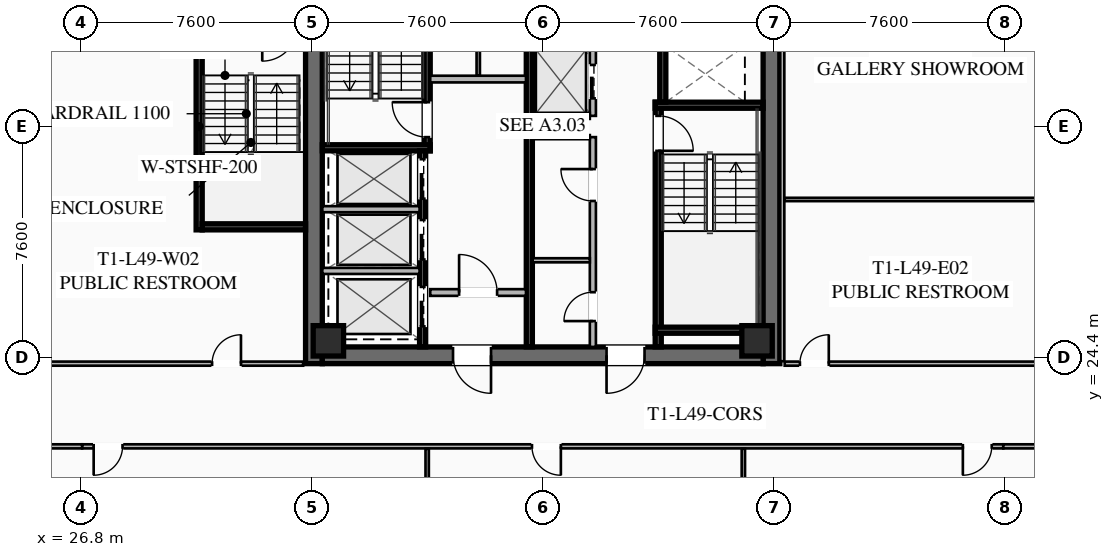
"""IFC4 building model, lengths in metres.
Left out: names, types, materials, properties, quantities, classifications, styles, units other than length and angle.
Written with IfcOpenShell. Run it as: python <this file> out.ifc"""

import sys

from ifc_helpers import new_model, si_unit, direction, frame, frame_2d, origin, origin_2d, place, context, subcontext, project, spatial, rectangle, hollow_rectangle, extrude, element, fill, save


model = new_model("IFC4")
c1 = context("Model", 3, precision=1e-05, world=origin(), true_north=direction((0.0, 1.0)))
c2 = subcontext(c1, "Body", "Model", "MODEL_VIEW")
j1 = project(units=[si_unit("LENGTHUNIT", "METRE"), si_unit("PLANEANGLEUNIT", "RADIAN")], contexts=[c1])
p1 = place(None, origin())
s1 = spatial("IfcSite", under=j1, at=p1, CompositionType="ELEMENT")
p2 = place(p1, origin())
s2 = spatial("IfcBuilding", under=s1, at=p2, CompositionType="ELEMENT")
p3 = place(p2, frame((0.0, 0.0, 181.85)))
s3 = spatial("IfcBuildingStorey", under=s2, at=p3, CompositionType="ELEMENT", Elevation=181.85)
for number, where, z_axis, x_axis in (
    (1, (34.475, 24.2, 0.0), (0.0, 0.0, 1.0), (0.0, 1.0, 0.0)),
    (2, (49.525, 39.8, 0.0), (0.0, 0.0, 1.0), (0.0, -1.0, 0.0)),
):
    element("IfcWall", number, at=place(p3, frame(where, z_axis=z_axis, x_axis=x_axis)), inside=s3, PredefinedType="SHEAR", context=c2, shape_type="SweptSolid", body=[
        extrude(rectangle(XDim=15.6, YDim=0.55, at=frame_2d((7.8, 0.0))), origin(), (0.0, 0.0, 1.0), 3.55),
    ])
p4 = place(p3, frame((49.25, 24.475, 0.0), z_axis=(0.0, 0.0, 1.0), x_axis=(-1.0, 0.0, 0.0)))
e3 = element("IfcWall", 3, at=p4, inside=s3, PredefinedType="SHEAR", context=c2, shape_type="SweptSolid", body=[
    extrude(rectangle(XDim=14.5, YDim=0.55, at=frame_2d((7.25, 0.0))), origin(), (0.0, 0.0, 1.0), 3.55),
])
p5 = place(p4, frame((8.95, 0.0, 0.0)))
e4 = element("IfcOpeningElement", 4, at=p5, cuts=e3, PredefinedType="OPENING", context=c2, shape_type="SweptSolid", body=[
    extrude(rectangle(XDim=1.25, YDim=2.25, at=frame_2d((0.625, 1.125))), frame((0.0, 0.285, 0.0), z_axis=(0.0, -1.0, 0.0), x_axis=(1.0, 0.0, 0.0)), (0.0, 0.0, 1.0), 0.57),
])
p6 = place(p4, frame((3.9, 0.0, 0.0)))
e5 = element("IfcOpeningElement", 5, at=p6, cuts=e3, PredefinedType="OPENING", context=c2, shape_type="SweptSolid", body=[
    extrude(rectangle(XDim=1.25, YDim=2.25, at=frame_2d((0.625, 1.125))), frame((0.0, 0.285, 0.0), z_axis=(0.0, -1.0, 0.0), x_axis=(1.0, 0.0, 0.0)), (0.0, 0.0, 1.0), 0.57),
])
for number, where, z_axis, x_axis in (
    (6, (34.95, 24.95, 0.0), (0.0, 0.0, 1.0), (1.0, 0.0, 0.0)),
    (7, (49.05, 24.95, 0.0), (0.0, 0.0, 1.0), (1.0, 0.0, 0.0)),
):
    element("IfcColumn", number, at=place(p3, frame(where, z_axis=z_axis, x_axis=x_axis)), inside=s3, PredefinedType="COLUMN", context=c2, shape_type="SweptSolid", body=[
        extrude(hollow_rectangle(XDim=1.0, YDim=1.0, WallThickness=0.04, at=origin_2d()), origin(), (0.0, 0.0, 1.0), 3.37),
    ])
p7 = place(p3, frame((38.2, 31.2, 0.0), z_axis=(0.0, 0.0, 1.0), x_axis=(0.0, 1.0, 0.0)))
e8 = element("IfcWall", 8, at=p7, inside=s3, PredefinedType="SHEAR", context=c2, shape_type="SweptSolid", body=[
    extrude(rectangle(XDim=8.05, YDim=0.2, at=frame_2d((4.025, 0.0))), origin(), (0.0, 0.0, 1.0), 3.37),
])
p8 = place(p7, frame((0.45, 0.0, 0.0)))
e9 = element("IfcOpeningElement", 9, at=p8, cuts=e8, PredefinedType="OPENING", context=c2, shape_type="SweptSolid", body=[
    extrude(rectangle(XDim=1.15, YDim=2.2, at=frame_2d((0.575, 1.1))), frame((0.0, 0.11, 0.0), z_axis=(0.0, -1.0, 0.0), x_axis=(1.0, 0.0, 0.0)), (0.0, 0.0, 1.0), 0.22),
])
p9 = place(p3, frame((34.75, 31.3, 0.0), z_axis=(0.0, 0.0, 1.0), x_axis=(1.0, 0.0, 0.0)))
e10 = element("IfcWall", 10, at=p9, inside=s3, PredefinedType="SHEAR", context=c2, shape_type="SweptSolid", body=[
    extrude(rectangle(XDim=3.55, YDim=0.2, at=frame_2d((1.775, 0.0))), origin(), (0.0, 0.0, 1.0), 3.37),
])
p10 = place(p3, frame((45.8, 32.8, 0.0), z_axis=(0.0, 0.0, 1.0), x_axis=(0.0, -1.0, 0.0)))
e11 = element("IfcWall", 11, at=p10, inside=s3, PredefinedType="SHEAR", context=c2, shape_type="SweptSolid", body=[
    extrude(rectangle(XDim=8.05, YDim=0.2, at=frame_2d((4.025, 0.0))), origin(), (0.0, 0.0, 1.0), 3.37),
])
p11 = place(p10, frame((0.45, 0.0, 0.0)))
e12 = element("IfcOpeningElement", 12, at=p11, cuts=e11, PredefinedType="OPENING", context=c2, shape_type="SweptSolid", body=[
    extrude(rectangle(XDim=1.15, YDim=2.2, at=frame_2d((0.575, 1.1))), frame((0.0, 0.11, 0.0), z_axis=(0.0, -1.0, 0.0), x_axis=(1.0, 0.0, 0.0)), (0.0, 0.0, 1.0), 0.22),
])
for number, where, z_axis, x_axis in (
    (13, (45.7, 32.7, 0.0), (0.0, 0.0, 1.0), (1.0, 0.0, 0.0)),
    (14, (45.7, 25.3, 0.0), (0.0, 0.0, 1.0), (1.0, 0.0, 0.0)),
):
    element("IfcWall", number, at=place(p3, frame(where, z_axis=z_axis, x_axis=x_axis)), inside=s3, PredefinedType="SHEAR", context=c2, shape_type="SweptSolid", body=[
        extrude(rectangle(XDim=3.55, YDim=0.2, at=frame_2d((1.775, 0.0))), origin(), (0.0, 0.0, 1.0), 3.37),
    ])
p12 = place(p3, frame((41.56, 24.75, 0.0), z_axis=(0.0, 0.0, 1.0), x_axis=(0.0, 1.0, 0.0)))
e15 = element("IfcWall", 15, at=p12, inside=s3, PredefinedType="SHEAR", context=c2, shape_type="SweptSolid", body=[
    extrude(rectangle(XDim=14.5, YDim=0.2, at=frame_2d((7.25, 0.0))), origin(), (0.0, 0.0, 1.0), 3.37),
])
p13 = place(p3, frame((38.3, 33.56, 0.0), z_axis=(0.0, 0.0, 1.0), x_axis=(1.0, 0.0, 0.0)))
e16 = element("IfcWall", 16, at=p13, inside=s3, PredefinedType="SOLIDWALL", context=c2, shape_type="SweptSolid", body=[
    extrude(rectangle(XDim=3.15, YDim=0.22, at=frame_2d((1.575, 0.0))), origin(), (0.0, 0.0, 1.0), 2.723),
])
p14 = place(p3, frame((38.3, 26.54, 0.0), z_axis=(0.0, 0.0, 1.0), x_axis=(1.0, 0.0, 0.0)))
e17 = element("IfcWall", 17, at=p14, inside=s3, PredefinedType="SOLIDWALL", context=c2, shape_type="SweptSolid", body=[
    extrude(rectangle(XDim=3.15, YDim=0.22, at=frame_2d((1.575, 0.0))), origin(), (0.0, 0.0, 1.0), 2.723),
])
p15 = place(p14, frame((0.95, 0.0, 0.0)))
e18 = element("IfcOpeningElement", 18, at=p15, cuts=e17, PredefinedType="OPENING", context=c2, shape_type="SweptSolid", body=[
    extrude(rectangle(XDim=1.25, YDim=2.25, at=frame_2d((0.625, 1.125))), frame((0.0, 0.12, 0.0), z_axis=(0.0, -1.0, 0.0), x_axis=(1.0, 0.0, 0.0)), (0.0, 0.0, 1.0), 0.24),
])
p16 = place(p3, frame((38.05, 24.75, 0.0), z_axis=(0.0, 0.0, 1.0), x_axis=(0.0, 1.0, 0.0)))
e19 = element("IfcWall", 19, at=p16, inside=s3, PredefinedType="SHEAR", context=c2, shape_type="SweptSolid", body=[
    extrude(rectangle(XDim=6.45, YDim=0.2, at=frame_2d((3.225, 0.0))), origin(), (0.0, 0.0, 1.0), 3.37),
])
p17 = place(p16, frame((4.875, 0.0, 0.0)))
e20 = element("IfcOpeningElement", 20, at=p17, cuts=e19, PredefinedType="OPENING", context=c2, shape_type="SweptSolid", body=[
    extrude(rectangle(XDim=1.3, YDim=2.25, at=frame_2d((0.65, 1.125))), frame((0.0, 0.11, 0.0), z_axis=(0.0, -1.0, 0.0), x_axis=(1.0, 0.0, 0.0)), (0.0, 0.0, 1.0), 0.22),
])
p18 = place(p16, frame((2.875, 0.0, 0.0)))
e21 = element("IfcOpeningElement", 21, at=p18, cuts=e19, PredefinedType="OPENING", context=c2, shape_type="SweptSolid", body=[
    extrude(rectangle(XDim=1.3, YDim=2.25, at=frame_2d((0.65, 1.125))), frame((0.0, 0.11, 0.0), z_axis=(0.0, -1.0, 0.0), x_axis=(1.0, 0.0, 0.0)), (0.0, 0.0, 1.0), 0.22),
])
p19 = place(p16, frame((0.675, 0.0, 0.0)))
e22 = element("IfcOpeningElement", 22, at=p19, cuts=e19, PredefinedType="OPENING", context=c2, shape_type="SweptSolid", body=[
    extrude(rectangle(XDim=1.3, YDim=2.25, at=frame_2d((0.65, 1.125))), frame((0.0, 0.11, 0.0), z_axis=(0.0, -1.0, 0.0), x_axis=(1.0, 0.0, 0.0)), (0.0, 0.0, 1.0), 0.22),
])
for number, where, z_axis, x_axis in (
    (23, (34.75, 27.25, 0.0), (0.0, 0.0, 1.0), (1.0, 0.0, 0.0)),
    (24, (34.75, 29.28, 0.0), (0.0, 0.0, 1.0), (1.0, 0.0, 0.0)),
):
    element("IfcWall", number, at=place(p3, frame(where, z_axis=z_axis, x_axis=x_axis)), inside=s3, PredefinedType="SOLIDWALL", context=c2, shape_type="SweptSolid", body=[
        extrude(rectangle(XDim=3.2, YDim=0.2, at=frame_2d((1.6, 0.0))), origin(), (0.0, 0.0, 1.0), 3.37),
    ])
p20 = place(p3, frame((45.95, 39.25, 0.0), z_axis=(0.0, 0.0, 1.0), x_axis=(0.0, -1.0, 0.0)))
e25 = element("IfcWall", 25, at=p20, inside=s3, PredefinedType="SHEAR", context=c2, shape_type="SweptSolid", body=[
    extrude(rectangle(XDim=6.45, YDim=0.2, at=frame_2d((3.225, 0.0))), origin(), (0.0, 0.0, 1.0), 3.37),
])
p21 = place(p3, frame((39.88, 33.68, 0.0), z_axis=(0.0, 0.0, 1.0), x_axis=(0.0, 1.0, 0.0)))
e26 = element("IfcWall", 26, at=p21, inside=s3, PredefinedType="PARTITIONING", context=c2, shape_type="SweptSolid", body=[
    extrude(rectangle(XDim=3.8, YDim=0.11, at=frame_2d((1.9, 0.0))), origin(), (0.0, 0.0, 1.0), 2.723),
])
p22 = place(p3, frame((43.65, 24.75, 0.0), z_axis=(0.0, 0.0, 1.0), x_axis=(0.0, 1.0, 0.0)))
e27 = element("IfcWall", 27, at=p22, inside=s3, PredefinedType="SOLIDWALL", context=c2, shape_type="SweptSolid", body=[
    extrude(rectangle(XDim=6.9, YDim=0.2, at=frame_2d((3.45, 0.0))), origin(), (0.0, 0.0, 1.0), 2.723),
])
p23 = place(p22, frame((0.85, 0.0, 0.0)))
e28 = element("IfcOpeningElement", 28, at=p23, cuts=e27, PredefinedType="OPENING", context=c2, shape_type="SweptSolid", body=[
    extrude(rectangle(XDim=0.95, YDim=2.05, at=frame_2d((0.475, 1.025))), frame((0.0, 0.11, 0.0), z_axis=(0.0, -1.0, 0.0), x_axis=(1.0, 0.0, 0.0)), (0.0, 0.0, 1.0), 0.22),
])
p24 = place(p22, frame((4.8, 0.0, 0.0)))
e29 = element("IfcOpeningElement", 29, at=p24, cuts=e27, PredefinedType="OPENING", context=c2, shape_type="SweptSolid", body=[
    extrude(rectangle(XDim=1.05, YDim=2.2, at=frame_2d((0.525, 1.1))), frame((0.0, 0.11, 0.0), z_axis=(0.0, -1.0, 0.0), x_axis=(1.0, 0.0, 0.0)), (0.0, 0.0, 1.0), 0.22),
])
for number, where, z_axis, x_axis in (
    (30, (41.67, 31.65, 0.0), (0.0, 0.0, 1.0), (1.0, 0.0, 0.0)),
    (31, (41.67, 27.6, 0.0), (0.0, 0.0, 1.0), (1.0, 0.0, 0.0)),
):
    element("IfcWall", number, at=place(p3, frame(where, z_axis=z_axis, x_axis=x_axis)), inside=s3, PredefinedType="PARTITIONING", context=c2, shape_type="SweptSolid", body=[
        extrude(rectangle(XDim=1.88, YDim=0.135, at=frame_2d((0.94, 0.0))), origin(), (0.0, 0.0, 1.0), 2.723),
    ])
p25 = place(p3, frame((43.65, 32.35, 0.0), z_axis=(0.0, 0.0, 1.0), x_axis=(0.0, 1.0, 0.0)))
e32 = element("IfcWall", 32, at=p25, inside=s3, PredefinedType="SOLIDWALL", context=c2, shape_type="SweptSolid", body=[
    extrude(rectangle(XDim=6.9, YDim=0.2, at=frame_2d((3.45, 0.0))), origin(), (0.0, 0.0, 1.0), 3.37),
])
p26 = place(p25, frame((0.575, 0.0, 0.0)))
e33 = element("IfcOpeningElement", 33, at=p26, cuts=e32, PredefinedType="OPENING", context=c2, shape_type="SweptSolid", body=[
    extrude(rectangle(XDim=1.1, YDim=2.2, at=frame_2d((0.55, 1.1))), frame((0.0, 0.11, 0.0), z_axis=(0.0, -1.0, 0.0), x_axis=(1.0, 0.0, 0.0)), (0.0, 0.0, 1.0), 0.22),
])
p27 = place(p25, frame((2.825, 0.0, 0.0)))
e34 = element("IfcOpeningElement", 34, at=p27, cuts=e32, PredefinedType="OPENING", context=c2, shape_type="SweptSolid", body=[
    extrude(rectangle(XDim=1.1, YDim=2.2, at=frame_2d((0.55, 1.1))), frame((0.0, 0.11, 0.0), z_axis=(0.0, -1.0, 0.0), x_axis=(1.0, 0.0, 0.0)), (0.0, 0.0, 1.0), 0.22),
])
p28 = place(p25, frame((5.075, 0.0, 0.0)))
e35 = element("IfcOpeningElement", 35, at=p28, cuts=e32, PredefinedType="OPENING", context=c2, shape_type="SweptSolid", body=[
    extrude(rectangle(XDim=1.1, YDim=2.2, at=frame_2d((0.55, 1.1))), frame((0.0, 0.11, 0.0), z_axis=(0.0, -1.0, 0.0), x_axis=(1.0, 0.0, 0.0)), (0.0, 0.0, 1.0), 0.22),
])
p29 = place(p3, frame((41.67, 32.35, 0.0), z_axis=(0.0, 0.0, 1.0), x_axis=(1.0, 0.0, 0.0)))
e36 = element("IfcWall", 36, at=p29, inside=s3, PredefinedType="SOLIDWALL", context=c2, shape_type="SweptSolid", body=[
    extrude(rectangle(XDim=1.88, YDim=0.2, at=frame_2d((0.94, 0.0))), origin(), (0.0, 0.0, 1.0), 3.37),
])
p30 = place(p3, frame((30.7, 28.6, 0.0), z_axis=(0.0, 0.0, 1.0), x_axis=(0.0, 1.0, 0.0)))
e37 = element("IfcWall", 37, at=p30, inside=s3, PredefinedType="SHEAR", context=c2, shape_type="SweptSolid", body=[
    extrude(rectangle(XDim=6.8, YDim=0.2, at=frame_2d((3.4, 0.0))), origin(), (0.0, 0.0, 1.0), 3.37),
])
p31 = place(p3, frame((30.8, 28.7, 0.0), z_axis=(0.0, 0.0, 1.0), x_axis=(1.0, 0.0, 0.0)))
e38 = element("IfcWall", 38, at=p31, inside=s3, PredefinedType="SHEAR", context=c2, shape_type="SweptSolid", body=[
    extrude(rectangle(XDim=3.4, YDim=0.2, at=frame_2d((1.7, 0.0))), origin(), (0.0, 0.0, 1.0), 3.37),
])
p32 = place(p3, frame((57.15, 21.48, 0.0), z_axis=(0.0, 0.0, 1.0), x_axis=(-1.0, 0.0, 0.0)))
e39 = element("IfcWall", 39, at=p32, inside=s3, PredefinedType="PARTITIONING", context=c2, shape_type="SweptSolid", body=[
    extrude(rectangle(XDim=30.3, YDim=0.135, at=frame_2d((15.15, 0.0))), origin(), (0.0, 0.0, 1.0), 2.723),
])
p33 = place(p32, frame((28.97, 0.0, 0.0)))
e40 = element("IfcOpeningElement", 40, at=p33, cuts=e39, PredefinedType="OPENING", context=c2, shape_type="SweptSolid", body=[
    extrude(rectangle(XDim=0.95, YDim=2.05, at=frame_2d((0.475, 1.025))), frame((0.0, 0.077, 0.0), z_axis=(0.0, -1.0, 0.0), x_axis=(1.0, 0.0, 0.0)), (0.0, 0.0, 1.0), 0.155),
])
p34 = place(p32, frame((14.553, 0.0, 0.0)))
e41 = element("IfcOpeningElement", 41, at=p34, cuts=e39, PredefinedType="OPENING", context=c2, shape_type="SweptSolid", body=[
    extrude(rectangle(XDim=0.95, YDim=2.05, at=frame_2d((0.475, 1.025))), frame((0.0, 0.077, 0.0), z_axis=(0.0, -1.0, 0.0), x_axis=(1.0, 0.0, 0.0)), (0.0, 0.0, 1.0), 0.155),
])
p35 = place(p32, frame((0.38, 0.0, 0.0)))
e42 = element("IfcOpeningElement", 42, at=p35, cuts=e39, PredefinedType="OPENING", context=c2, shape_type="SweptSolid", body=[
    extrude(rectangle(XDim=0.95, YDim=2.05, at=frame_2d((0.475, 1.025))), frame((0.0, 0.077, 0.0), z_axis=(0.0, -1.0, 0.0), x_axis=(1.0, 0.0, 0.0)), (0.0, 0.0, 1.0), 0.155),
])
for number, where, z_axis, x_axis in (
    (43, (24.32, 21.48, 0.0), (0.0, 0.0, 1.0), (1.0, 0.0, 0.0)),
    (44, (57.15, 21.48, 0.0), (0.0, 0.0, 1.0), (1.0, 0.0, 0.0)),
):
    element("IfcWall", number, at=place(p3, frame(where, z_axis=z_axis, x_axis=x_axis)), inside=s3, PredefinedType="PARTITIONING", context=c2, shape_type="SweptSolid", body=[
        extrude(rectangle(XDim=2.53, YDim=0.135, at=frame_2d((1.265, 0.0))), origin(), (0.0, 0.0, 1.0), 2.723),
    ])
for number, where, z_axis, x_axis in (
    (45, (38.2, 14.47, 0.0), (0.0, 0.0, 1.0), (0.0, 1.0, 0.0)),
    (46, (48.6, 14.47, 0.0), (0.0, 0.0, 1.0), (0.0, 1.0, 0.0)),
):
    element("IfcWall", number, at=place(p3, frame(where, z_axis=z_axis, x_axis=x_axis)), inside=s3, PredefinedType="PARTITIONING", context=c2, shape_type="SweptSolid", body=[
        extrude(rectangle(XDim=6.93, YDim=0.11, at=frame_2d((3.465, 0.0))), origin(), (0.0, 0.0, 1.0), 2.723),
    ])
p36 = place(p3, frame((49.88, 39.72, 0.0), z_axis=(0.0, 0.0, 1.0), x_axis=(0.0, -1.0, 0.0)))
e47 = element("IfcWall", 47, at=p36, inside=s3, PredefinedType="PARTITIONING", context=c2, shape_type="SweptSolid", body=[
    extrude(rectangle(XDim=15.44, YDim=0.135, at=frame_2d((7.72, 0.0))), origin(), (0.0, 0.0, 1.0), 2.723),
])
p37 = place(p3, frame((49.96, 24.2, 0.0), z_axis=(0.0, 0.0, 1.0), x_axis=(1.0, 0.0, 0.0)))
e48 = element("IfcWall", 48, at=p37, inside=s3, PredefinedType="PARTITIONING", context=c2, shape_type="SweptSolid", body=[
    extrude(rectangle(XDim=9.72, YDim=0.135, at=frame_2d((4.86, 0.0))), origin(), (0.0, 0.0, 1.0), 2.723),
])
p38 = place(p37, frame((0.5, 0.0, 0.0)))
e49 = element("IfcOpeningElement", 49, at=p38, cuts=e48, PredefinedType="OPENING", context=c2, shape_type="SweptSolid", body=[
    extrude(rectangle(XDim=0.95, YDim=2.05, at=frame_2d((0.475, 1.025))), frame((0.0, 0.077, 0.0), z_axis=(0.0, -1.0, 0.0), x_axis=(1.0, 0.0, 0.0)), (0.0, 0.0, 1.0), 0.155),
])
p39 = place(p3, frame((49.96, 29.6, 0.0), z_axis=(0.0, 0.0, 1.0), x_axis=(1.0, 0.0, 0.0)))
e50 = element("IfcWall", 50, at=p39, inside=s3, PredefinedType="PARTITIONING", context=c2, shape_type="SweptSolid", body=[
    extrude(rectangle(XDim=9.72, YDim=0.11, at=frame_2d((4.86, 0.0))), origin(), (0.0, 0.0, 1.0), 2.723),
])
p40 = place(p3, frame((24.32, 24.2, 0.0), z_axis=(0.0, 0.0, 1.0), x_axis=(1.0, 0.0, 0.0)))
e51 = element("IfcWall", 51, at=p40, inside=s3, PredefinedType="PARTITIONING", context=c2, shape_type="SweptSolid", body=[
    extrude(rectangle(XDim=9.8, YDim=0.135, at=frame_2d((4.9, 0.0))), origin(), (0.0, 0.0, 1.0), 2.723),
])
p41 = place(p40, frame((6.805, 0.0, 0.0)))
e52 = element("IfcOpeningElement", 52, at=p41, cuts=e51, PredefinedType="OPENING", context=c2, shape_type="SweptSolid", body=[
    extrude(rectangle(XDim=0.95, YDim=2.05, at=frame_2d((0.475, 1.025))), frame((0.0, 0.077, 0.0), z_axis=(0.0, -1.0, 0.0), x_axis=(1.0, 0.0, 0.0)), (0.0, 0.0, 1.0), 0.155),
])
p42 = place(p5, origin())
e53 = element("IfcDoor", 53, at=p42, inside=s3, OperationType="SINGLE_SWING_LEFT", PredefinedType="DOOR", context=c2, shape_type="SweptSolid", body=[
    extrude(rectangle(XDim=1.25, YDim=2.25, at=frame_2d((0.625, 1.125))), frame((0.0, 0.025, 0.0), z_axis=(0.0, -1.0, 0.0), x_axis=(1.0, 0.0, 0.0)), (0.0, 0.0, 1.0), 0.05),
])
fill(e4, e53)
p43 = place(p6, origin())
e54 = element("IfcDoor", 54, at=p43, inside=s3, OperationType="SINGLE_SWING_RIGHT", PredefinedType="DOOR", context=c2, shape_type="SweptSolid", body=[
    extrude(rectangle(XDim=1.25, YDim=2.25, at=frame_2d((0.625, 1.125))), frame((0.0, 0.025, 0.0), z_axis=(0.0, -1.0, 0.0), x_axis=(1.0, 0.0, 0.0)), (0.0, 0.0, 1.0), 0.05),
])
fill(e5, e54)
p44 = place(p8, origin())
e55 = element("IfcDoor", 55, at=p44, inside=s3, OperationType="SINGLE_SWING_RIGHT", PredefinedType="DOOR", context=c2, shape_type="SweptSolid", body=[
    extrude(rectangle(XDim=1.15, YDim=2.2, at=frame_2d((0.575, 1.1))), frame((0.0, 0.025, 0.0), z_axis=(0.0, -1.0, 0.0), x_axis=(1.0, 0.0, 0.0)), (0.0, 0.0, 1.0), 0.05),
])
fill(e9, e55)
p45 = place(p11, origin())
e56 = element("IfcDoor", 56, at=p45, inside=s3, OperationType="SINGLE_SWING_RIGHT", PredefinedType="DOOR", context=c2, shape_type="SweptSolid", body=[
    extrude(rectangle(XDim=1.15, YDim=2.2, at=frame_2d((0.575, 1.1))), frame((0.0, 0.025, 0.0), z_axis=(0.0, -1.0, 0.0), x_axis=(1.0, 0.0, 0.0)), (0.0, 0.0, 1.0), 0.05),
])
fill(e12, e56)
p46 = place(p15, origin())
e57 = element("IfcDoor", 57, at=p46, inside=s3, OperationType="SINGLE_SWING_LEFT", PredefinedType="DOOR", context=c2, shape_type="SweptSolid", body=[
    extrude(rectangle(XDim=1.25, YDim=2.25, at=frame_2d((0.625, 1.125))), frame((0.0, 0.025, 0.0), z_axis=(0.0, -1.0, 0.0), x_axis=(1.0, 0.0, 0.0)), (0.0, 0.0, 1.0), 0.05),
])
fill(e18, e57)
p47 = place(p23, origin())
e58 = element("IfcDoor", 58, at=p47, inside=s3, OperationType="SINGLE_SWING_LEFT", PredefinedType="DOOR", context=c2, shape_type="SweptSolid", body=[
    extrude(rectangle(XDim=0.95, YDim=2.05, at=frame_2d((0.475, 1.025))), frame((0.0, 0.025, 0.0), z_axis=(0.0, -1.0, 0.0), x_axis=(1.0, 0.0, 0.0)), (0.0, 0.0, 1.0), 0.05),
])
fill(e28, e58)
p48 = place(p24, origin())
e59 = element("IfcDoor", 59, at=p48, inside=s3, OperationType="SINGLE_SWING_RIGHT", PredefinedType="DOOR", context=c2, shape_type="SweptSolid", body=[
    extrude(rectangle(XDim=1.05, YDim=2.2, at=frame_2d((0.525, 1.1))), frame((0.0, 0.025, 0.0), z_axis=(0.0, -1.0, 0.0), x_axis=(1.0, 0.0, 0.0)), (0.0, 0.0, 1.0), 0.05),
])
fill(e29, e59)
p49 = place(p33, origin())
e60 = element("IfcDoor", 60, at=p49, inside=s3, OperationType="SINGLE_SWING_RIGHT", PredefinedType="DOOR", context=c2, shape_type="SweptSolid", body=[
    extrude(rectangle(XDim=0.95, YDim=2.05, at=frame_2d((0.475, 1.025))), frame((0.0, 0.025, 0.0), z_axis=(0.0, -1.0, 0.0), x_axis=(1.0, 0.0, 0.0)), (0.0, 0.0, 1.0), 0.05),
])
fill(e40, e60)
p50 = place(p34, origin())
e61 = element("IfcDoor", 61, at=p50, inside=s3, OperationType="SINGLE_SWING_LEFT", PredefinedType="DOOR", context=c2, shape_type="SweptSolid", body=[
    extrude(rectangle(XDim=0.95, YDim=2.05, at=frame_2d((0.475, 1.025))), frame((0.0, 0.025, 0.0), z_axis=(0.0, -1.0, 0.0), x_axis=(1.0, 0.0, 0.0)), (0.0, 0.0, 1.0), 0.05),
])
fill(e41, e61)
p51 = place(p35, origin())
e62 = element("IfcDoor", 62, at=p51, inside=s3, OperationType="SINGLE_SWING_RIGHT", PredefinedType="DOOR", context=c2, shape_type="SweptSolid", body=[
    extrude(rectangle(XDim=0.95, YDim=2.05, at=frame_2d((0.475, 1.025))), frame((0.0, 0.025, 0.0), z_axis=(0.0, -1.0, 0.0), x_axis=(1.0, 0.0, 0.0)), (0.0, 0.0, 1.0), 0.05),
])
fill(e42, e62)
p52 = place(p38, origin())
e63 = element("IfcDoor", 63, at=p52, inside=s3, OperationType="SINGLE_SWING_RIGHT", PredefinedType="DOOR", context=c2, shape_type="SweptSolid", body=[
    extrude(rectangle(XDim=0.95, YDim=2.05, at=frame_2d((0.475, 1.025))), frame((0.0, 0.025, 0.0), z_axis=(0.0, -1.0, 0.0), x_axis=(1.0, 0.0, 0.0)), (0.0, 0.0, 1.0), 0.05),
])
fill(e49, e63)
p53 = place(p41, origin())
e64 = element("IfcDoor", 64, at=p53, inside=s3, OperationType="SINGLE_SWING_RIGHT", PredefinedType="DOOR", context=c2, shape_type="SweptSolid", body=[
    extrude(rectangle(XDim=0.95, YDim=2.05, at=frame_2d((0.475, 1.025))), frame((0.0, 0.025, 0.0), z_axis=(0.0, -1.0, 0.0), x_axis=(1.0, 0.0, 0.0)), (0.0, 0.0, 1.0), 0.05),
])
fill(e52, e64)
p54 = place(p17, origin())
e65 = element("IfcDoor", 65, at=p54, inside=s3, OperationType="SLIDING_TO_LEFT", PredefinedType="DOOR", context=c2, shape_type="SweptSolid", body=[
    extrude(rectangle(XDim=1.3, YDim=2.25, at=frame_2d((0.65, 1.125))), frame((0.0, 0.025, 0.0), z_axis=(0.0, -1.0, 0.0), x_axis=(1.0, 0.0, 0.0)), (0.0, 0.0, 1.0), 0.05),
])
fill(e20, e65)
p55 = place(p18, origin())
e66 = element("IfcDoor", 66, at=p55, inside=s3, OperationType="SLIDING_TO_LEFT", PredefinedType="DOOR", context=c2, shape_type="SweptSolid", body=[
    extrude(rectangle(XDim=1.3, YDim=2.25, at=frame_2d((0.65, 1.125))), frame((0.0, 0.025, 0.0), z_axis=(0.0, -1.0, 0.0), x_axis=(1.0, 0.0, 0.0)), (0.0, 0.0, 1.0), 0.05),
])
fill(e21, e66)
p56 = place(p19, origin())
e67 = element("IfcDoor", 67, at=p56, inside=s3, OperationType="SLIDING_TO_LEFT", PredefinedType="DOOR", context=c2, shape_type="SweptSolid", body=[
    extrude(rectangle(XDim=1.3, YDim=2.25, at=frame_2d((0.65, 1.125))), frame((0.0, 0.025, 0.0), z_axis=(0.0, -1.0, 0.0), x_axis=(1.0, 0.0, 0.0)), (0.0, 0.0, 1.0), 0.05),
])
fill(e22, e67)
p57 = place(p26, origin())
e68 = element("IfcDoor", 68, at=p57, inside=s3, OperationType="SLIDING_TO_LEFT", PredefinedType="DOOR", context=c2, shape_type="SweptSolid", body=[
    extrude(rectangle(XDim=1.1, YDim=2.2, at=frame_2d((0.55, 1.1))), frame((0.0, 0.025, 0.0), z_axis=(0.0, -1.0, 0.0), x_axis=(1.0, 0.0, 0.0)), (0.0, 0.0, 1.0), 0.05),
])
fill(e33, e68)
save(model, sys.argv[1])
